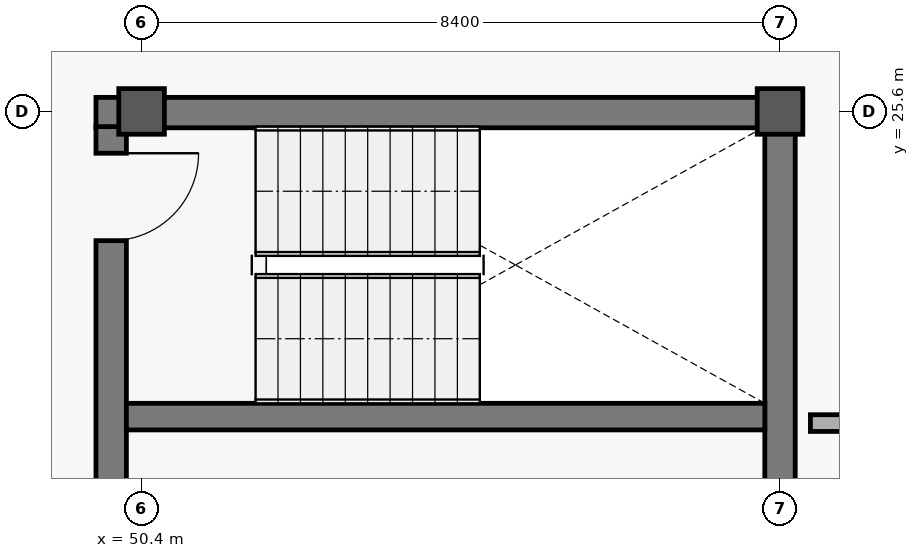
"""IFC4 building model, lengths in metres.
Left out: names, types, materials, properties, quantities, classifications, styles, units other than length and angle.
Written with IfcOpenShell. Run it as: python <this file> out.ifc"""

import sys

from ifc_helpers import new_model, si_unit, direction, frame, frame_2d, origin, origin_2d, place, context, subcontext, project, spatial, rectangle, extrude, element, fill, save


model = new_model("IFC4")
c1 = context("Model", 3, precision=1e-05, world=origin(), true_north=direction((0.0, 1.0)))
c2 = subcontext(c1, "Body", "Model", "MODEL_VIEW")
j1 = project(units=[si_unit("LENGTHUNIT", "METRE"), si_unit("PLANEANGLEUNIT", "RADIAN")], contexts=[c1])
p1 = place(None, origin())
s1 = spatial("IfcSite", under=j1, at=p1, CompositionType="ELEMENT")
p2 = place(p1, origin())
s2 = spatial("IfcBuilding", under=s1, at=p2, CompositionType="ELEMENT")
p3 = place(p2, frame((0.0, 0.0, 37.2)))
s3 = spatial("IfcBuildingStorey", under=s2, at=p3, CompositionType="ELEMENT", Elevation=37.2)
for number, where, z_axis, x_axis in (
    (1, (50.4, 25.6, 0.0), (0.0, 0.0, 1.0), (1.0, 0.0, 0.0)),
    (2, (58.8, 25.6, 0.0), (0.0, 0.0, 1.0), (1.0, 0.0, 0.0)),
):
    element("IfcColumn", number, at=place(p3, frame(where, z_axis=z_axis, x_axis=x_axis)), inside=s3, PredefinedType="COLUMN", context=c2, shape_type="SweptSolid", body=[
        extrude(rectangle(XDim=0.6, YDim=0.6, at=origin_2d()), origin(), (0.0, 0.0, 1.0), 3.6),
    ])
p4 = place(p3, frame((59.0, 25.585, 0.0), z_axis=(0.0, 0.0, 1.0), x_axis=(-1.0, 0.0, 0.0)))
e3 = element("IfcWall", 3, at=p4, inside=s3, PredefinedType="SHEAR", context=c2, shape_type="SweptSolid", body=[
    extrude(rectangle(XDim=9.2, YDim=0.4, at=frame_2d((4.6, 0.0))), origin(), (0.0, 0.0, 1.0), 3.32),
])
p5 = place(p3, frame((50.0, 25.4, 0.0), z_axis=(0.0, 0.0, 1.0), x_axis=(0.0, -1.0, 0.0)))
e4 = element("IfcWall", 4, at=p5, inside=s3, PredefinedType="SHEAR", context=c2, shape_type="SweptSolid", body=[
    extrude(rectangle(XDim=7.4, YDim=0.4, at=frame_2d((3.7, 0.0))), origin(), (0.0, 0.0, 1.0), 3.32),
])
p6 = place(p5, frame((0.35, 0.0, 0.0)))
e5 = element("IfcOpeningElement", 5, at=p6, cuts=e4, PredefinedType="OPENING", context=c2, shape_type="SweptSolid", body=[
    extrude(rectangle(XDim=1.15, YDim=2.2, at=frame_2d((0.575, 1.1))), frame((0.0, 0.21, 0.0), z_axis=(0.0, -1.0, 0.0), x_axis=(1.0, 0.0, 0.0)), (0.0, 0.0, 1.0), 0.42),
])
p7 = place(p3, frame((58.8, 18.0, 0.0), z_axis=(0.0, 0.0, 1.0), x_axis=(0.0, 1.0, 0.0)))
e6 = element("IfcWall", 6, at=p7, inside=s3, PredefinedType="SHEAR", context=c2, shape_type="SweptSolid", body=[
    extrude(rectangle(XDim=7.4, YDim=0.4, at=frame_2d((3.7, 0.0))), origin(), (0.0, 0.0, 1.0), 3.32),
])
p8 = place(p3, frame((50.2, 21.585, 0.0), z_axis=(0.0, 0.0, 1.0), x_axis=(1.0, 0.0, 0.0)))
e7 = element("IfcWall", 7, at=p8, inside=s3, PredefinedType="SHEAR", context=c2, shape_type="SweptSolid", body=[
    extrude(rectangle(XDim=8.4, YDim=0.35, at=frame_2d((4.2, 0.0))), origin(), (0.0, 0.0, 1.0), 3.32),
])
p9 = place(p3, frame((59.2, 21.5, 0.0), z_axis=(0.0, 0.0, 1.0), x_axis=(1.0, 0.0, 0.0)))
e8 = element("IfcWall", 8, at=p9, inside=s3, PredefinedType="SOLIDWALL", context=c2, shape_type="SweptSolid", body=[
    extrude(rectangle(XDim=4.8, YDim=0.22, at=frame_2d((2.4, 0.0))), origin(), (0.0, 0.0, 1.0), 2.47),
])
p10 = place(p9, frame((1.15, 0.0, 0.0)))
e9 = element("IfcOpeningElement", 9, at=p10, cuts=e8, PredefinedType="OPENING", context=c2, shape_type="SweptSolid", body=[
    extrude(rectangle(XDim=1.25, YDim=2.2, at=frame_2d((0.625, 1.1))), frame((0.0, 0.12, 0.0), z_axis=(0.0, -1.0, 0.0), x_axis=(1.0, 0.0, 0.0)), (0.0, 0.0, 1.0), 0.24),
])
p11 = place(p6, origin())
e10 = element("IfcDoor", 10, at=p11, inside=s3, OperationType="SINGLE_SWING_LEFT", PredefinedType="DOOR", context=c2, shape_type="SweptSolid", body=[
    extrude(rectangle(XDim=1.15, YDim=2.2, at=frame_2d((0.575, 1.1))), frame((0.0, 0.025, 0.0), z_axis=(0.0, -1.0, 0.0), x_axis=(1.0, 0.0, 0.0)), (0.0, 0.0, 1.0), 0.05),
])
fill(e5, e10)
save(model, sys.argv[1])
